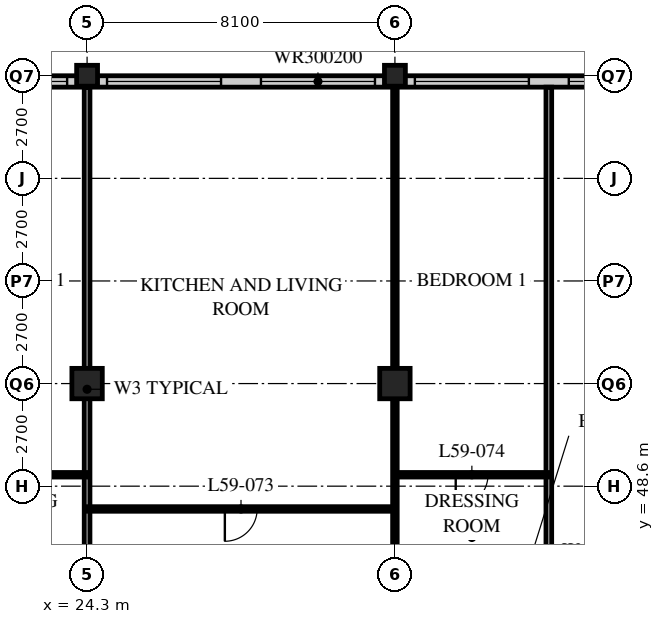
"""IFC4 building model, lengths in metres.
Left out: names, types, materials, properties, quantities, classifications, styles, units other than length and angle.
Written with IfcOpenShell. Run it as: python <this file> out.ifc"""

import sys

from ifc_helpers import new_model, si_unit, direction, frame, frame_2d, origin, origin_2d, place, context, subcontext, project, spatial, rectangle, hollow_rectangle, extrude, element, fill, save


model = new_model("IFC4")
c1 = context("Model", 3, precision=1e-05, world=origin(), true_north=direction((0.0, 1.0)))
c2 = subcontext(c1, "Body", "Model", "MODEL_VIEW")
j1 = project(units=[si_unit("LENGTHUNIT", "METRE"), si_unit("PLANEANGLEUNIT", "RADIAN")], contexts=[c1])
p1 = place(None, origin())
s1 = spatial("IfcSite", under=j1, at=p1, CompositionType="ELEMENT")
p2 = place(p1, origin())
s2 = spatial("IfcBuilding", under=s1, at=p2, CompositionType="ELEMENT")
p3 = place(p2, frame((0.0, 0.0, 228.0)))
s3 = spatial("IfcBuildingStorey", under=s2, at=p3, CompositionType="ELEMENT", Elevation=228.0)
p4 = place(p3, frame((24.3, 51.3, 0.0), z_axis=(0.0, 0.0, 1.0), x_axis=(1.0, 0.0, 0.0)))
e1 = element("IfcColumn", 1, at=p4, inside=s3, PredefinedType="COLUMN", context=c2, shape_type="SweptSolid", body=[
    extrude(hollow_rectangle(XDim=0.8, YDim=0.8, WallThickness=0.08, at=origin_2d()), origin(), (0.0, 0.0, 1.0), 3.6),
])
p5 = place(p3, frame((24.3, 59.4, 0.0), z_axis=(0.0, 0.0, 1.0), x_axis=(1.0, 0.0, 0.0)))
e2 = element("IfcColumn", 2, at=p5, inside=s3, PredefinedType="COLUMN", context=c2, shape_type="SweptSolid", body=[
    extrude(hollow_rectangle(XDim=0.55, YDim=0.55, WallThickness=0.045, at=origin_2d()), origin(), (0.0, 0.0, 1.0), 3.6),
])
p6 = place(p3, frame((32.4, 51.3, 0.0), z_axis=(0.0, 0.0, 1.0), x_axis=(1.0, 0.0, 0.0)))
e3 = element("IfcColumn", 3, at=p6, inside=s3, PredefinedType="COLUMN", context=c2, shape_type="SweptSolid", body=[
    extrude(hollow_rectangle(XDim=0.8, YDim=0.8, WallThickness=0.08, at=origin_2d()), origin(), (0.0, 0.0, 1.0), 3.6),
])
p7 = place(p3, frame((32.4, 59.4, 0.0), z_axis=(0.0, 0.0, 1.0), x_axis=(1.0, 0.0, 0.0)))
e4 = element("IfcColumn", 4, at=p7, inside=s3, PredefinedType="COLUMN", context=c2, shape_type="SweptSolid", body=[
    extrude(hollow_rectangle(XDim=0.55, YDim=0.55, WallThickness=0.045, at=origin_2d()), origin(), (0.0, 0.0, 1.0), 3.6),
])
p8 = place(p3, frame((48.3, 59.25, 0.0), z_axis=(0.0, 0.0, 1.0), x_axis=(-1.0, 0.0, 0.0)))
e5 = element("IfcWall", 5, at=p8, inside=s3, PredefinedType="SOLIDWALL", context=c2, shape_type="SweptSolid", body=[
    extrude(rectangle(XDim=40.2, YDim=0.3, at=frame_2d((20.1, 0.0))), origin(), (0.0, 0.0, 1.0), 3.39),
])
p9 = place(p8, frame((0.225, 0.0, 0.6)))
e6 = element("IfcOpeningElement", 6, at=p9, cuts=e5, PredefinedType="OPENING", context=c2, shape_type="SweptSolid", body=[
    extrude(rectangle(XDim=3.0, YDim=2.0, at=frame_2d((1.5, 1.0))), frame((0.0, 0.16, 0.0), z_axis=(0.0, -1.0, 0.0), x_axis=(1.0, 0.0, 0.0)), (0.0, 0.0, 1.0), 0.32),
])
p10 = place(p8, frame((4.275, 0.0, 0.6)))
e7 = element("IfcOpeningElement", 7, at=p10, cuts=e5, PredefinedType="OPENING", context=c2, shape_type="SweptSolid", body=[
    extrude(rectangle(XDim=3.0, YDim=2.0, at=frame_2d((1.5, 1.0))), frame((0.0, 0.16, 0.0), z_axis=(0.0, -1.0, 0.0), x_axis=(1.0, 0.0, 0.0)), (0.0, 0.0, 1.0), 0.32),
])
p11 = place(p8, frame((8.325, 0.0, 0.6)))
e8 = element("IfcOpeningElement", 8, at=p11, cuts=e5, PredefinedType="OPENING", context=c2, shape_type="SweptSolid", body=[
    extrude(rectangle(XDim=3.0, YDim=2.0, at=frame_2d((1.5, 1.0))), frame((0.0, 0.16, 0.0), z_axis=(0.0, -1.0, 0.0), x_axis=(1.0, 0.0, 0.0)), (0.0, 0.0, 1.0), 0.32),
])
p12 = place(p8, frame((12.375, 0.0, 0.6)))
e9 = element("IfcOpeningElement", 9, at=p12, cuts=e5, PredefinedType="OPENING", context=c2, shape_type="SweptSolid", body=[
    extrude(rectangle(XDim=3.0, YDim=2.0, at=frame_2d((1.5, 1.0))), frame((0.0, 0.16, 0.0), z_axis=(0.0, -1.0, 0.0), x_axis=(1.0, 0.0, 0.0)), (0.0, 0.0, 1.0), 0.32),
])
p13 = place(p8, frame((16.425, 0.0, 0.6)))
e10 = element("IfcOpeningElement", 10, at=p13, cuts=e5, PredefinedType="OPENING", context=c2, shape_type="SweptSolid", body=[
    extrude(rectangle(XDim=3.0, YDim=2.0, at=frame_2d((1.5, 1.0))), frame((0.0, 0.16, 0.0), z_axis=(0.0, -1.0, 0.0), x_axis=(1.0, 0.0, 0.0)), (0.0, 0.0, 1.0), 0.32),
])
p14 = place(p8, frame((20.475, 0.0, 0.6)))
e11 = element("IfcOpeningElement", 11, at=p14, cuts=e5, PredefinedType="OPENING", context=c2, shape_type="SweptSolid", body=[
    extrude(rectangle(XDim=3.0, YDim=2.0, at=frame_2d((1.5, 1.0))), frame((0.0, 0.16, 0.0), z_axis=(0.0, -1.0, 0.0), x_axis=(1.0, 0.0, 0.0)), (0.0, 0.0, 1.0), 0.32),
])
p15 = place(p8, frame((24.525, 0.0, 0.6)))
e12 = element("IfcOpeningElement", 12, at=p15, cuts=e5, PredefinedType="OPENING", context=c2, shape_type="SweptSolid", body=[
    extrude(rectangle(XDim=3.0, YDim=2.0, at=frame_2d((1.5, 1.0))), frame((0.0, 0.16, 0.0), z_axis=(0.0, -1.0, 0.0), x_axis=(1.0, 0.0, 0.0)), (0.0, 0.0, 1.0), 0.32),
])
p16 = place(p8, frame((28.575, 0.0, 0.6)))
e13 = element("IfcOpeningElement", 13, at=p16, cuts=e5, PredefinedType="OPENING", context=c2, shape_type="SweptSolid", body=[
    extrude(rectangle(XDim=3.0, YDim=2.0, at=frame_2d((1.5, 1.0))), frame((0.0, 0.16, 0.0), z_axis=(0.0, -1.0, 0.0), x_axis=(1.0, 0.0, 0.0)), (0.0, 0.0, 1.0), 0.32),
])
p17 = place(p8, frame((32.625, 0.0, 0.6)))
e14 = element("IfcOpeningElement", 14, at=p17, cuts=e5, PredefinedType="OPENING", context=c2, shape_type="SweptSolid", body=[
    extrude(rectangle(XDim=3.0, YDim=2.0, at=frame_2d((1.5, 1.0))), frame((0.0, 0.16, 0.0), z_axis=(0.0, -1.0, 0.0), x_axis=(1.0, 0.0, 0.0)), (0.0, 0.0, 1.0), 0.32),
])
p18 = place(p8, frame((36.675, 0.0, 0.6)))
e15 = element("IfcOpeningElement", 15, at=p18, cuts=e5, PredefinedType="OPENING", context=c2, shape_type="SweptSolid", body=[
    extrude(rectangle(XDim=3.0, YDim=2.0, at=frame_2d((1.5, 1.0))), frame((0.0, 0.16, 0.0), z_axis=(0.0, -1.0, 0.0), x_axis=(1.0, 0.0, 0.0)), (0.0, 0.0, 1.0), 0.32),
])
p19 = place(p3, frame((24.3, 43.2, 0.0), z_axis=(0.0, 0.0, 1.0), x_axis=(0.0, 1.0, 0.0)))
e16 = element("IfcWall", 16, at=p19, inside=s3, PredefinedType="PARTITIONING", context=c2, shape_type="SweptSolid", body=[
    extrude(rectangle(XDim=15.9, YDim=0.15, at=frame_2d((7.95, 0.0))), origin(), (0.0, 0.0, 1.0), 2.628),
])
p20 = place(p3, frame((32.4, 45.6, 0.0), z_axis=(0.0, 0.0, 1.0), x_axis=(0.0, 1.0, 0.0)))
e17 = element("IfcWall", 17, at=p20, inside=s3, PredefinedType="PARTITIONING", context=c2, shape_type="SweptSolid", body=[
    extrude(rectangle(XDim=13.5, YDim=0.12, at=frame_2d((6.75, 0.0))), origin(), (0.0, 0.0, 1.0), 2.628),
])
p21 = place(p3, frame((36.45, 43.2, 0.0), z_axis=(0.0, 0.0, 1.0), x_axis=(0.0, 1.0, 0.0)))
e18 = element("IfcWall", 18, at=p21, inside=s3, PredefinedType="PARTITIONING", context=c2, shape_type="SweptSolid", body=[
    extrude(rectangle(XDim=15.9, YDim=0.15, at=frame_2d((7.95, 0.0))), origin(), (0.0, 0.0, 1.0), 3.39),
])
p22 = place(p3, frame((20.25, 48.9, 0.0), z_axis=(0.0, 0.0, 1.0), x_axis=(1.0, 0.0, 0.0)))
e19 = element("IfcWall", 19, at=p22, inside=s3, PredefinedType="PARTITIONING", context=c2, shape_type="SweptSolid", body=[
    extrude(rectangle(XDim=4.05, YDim=0.12, at=frame_2d((2.025, 0.0))), origin(), (0.0, 0.0, 1.0), 3.39),
])
p23 = place(p22, frame((1.6, 0.0, 0.0)))
e20 = element("IfcOpeningElement", 20, at=p23, cuts=e19, PredefinedType="OPENING", context=c2, shape_type="SweptSolid", body=[
    extrude(rectangle(XDim=0.85, YDim=2.1, at=frame_2d((0.425, 1.05))), frame((0.0, 0.07, 0.0), z_axis=(0.0, -1.0, 0.0), x_axis=(1.0, 0.0, 0.0)), (0.0, 0.0, 1.0), 0.14),
])
p24 = place(p3, frame((24.3, 48.0, 0.0), z_axis=(0.0, 0.0, 1.0), x_axis=(1.0, 0.0, 0.0)))
e21 = element("IfcWall", 21, at=p24, inside=s3, PredefinedType="PARTITIONING", context=c2, shape_type="SweptSolid", body=[
    extrude(rectangle(XDim=8.1, YDim=0.12, at=frame_2d((4.05, 0.0))), origin(), (0.0, 0.0, 1.0), 3.39),
])
p25 = place(p24, frame((3.625, 0.0, 0.0)))
e22 = element("IfcOpeningElement", 22, at=p25, cuts=e21, PredefinedType="OPENING", context=c2, shape_type="SweptSolid", body=[
    extrude(rectangle(XDim=0.85, YDim=2.1, at=frame_2d((0.425, 1.05))), frame((0.0, 0.07, 0.0), z_axis=(0.0, -1.0, 0.0), x_axis=(1.0, 0.0, 0.0)), (0.0, 0.0, 1.0), 0.14),
])
p26 = place(p3, frame((32.4, 48.9, 0.0), z_axis=(0.0, 0.0, 1.0), x_axis=(1.0, 0.0, 0.0)))
e23 = element("IfcWall", 23, at=p26, inside=s3, PredefinedType="PARTITIONING", context=c2, shape_type="SweptSolid", body=[
    extrude(rectangle(XDim=4.05, YDim=0.12, at=frame_2d((2.025, 0.0))), origin(), (0.0, 0.0, 1.0), 3.39),
])
p27 = place(p26, frame((1.6, 0.0, 0.0)))
e24 = element("IfcOpeningElement", 24, at=p27, cuts=e23, PredefinedType="OPENING", context=c2, shape_type="SweptSolid", body=[
    extrude(rectangle(XDim=0.85, YDim=2.1, at=frame_2d((0.425, 1.05))), frame((0.0, 0.07, 0.0), z_axis=(0.0, -1.0, 0.0), x_axis=(1.0, 0.0, 0.0)), (0.0, 0.0, 1.0), 0.14),
])
p28 = place(p11, origin())
e25 = element("IfcWindow", 25, at=p28, inside=s3, PartitioningType="SINGLE_PANEL", PredefinedType="WINDOW", context=c2, shape_type="SweptSolid", body=[
    extrude(rectangle(XDim=3.0, YDim=2.0, at=frame_2d((1.5, 1.0))), frame((0.0, 0.03, 0.0), z_axis=(0.0, -1.0, 0.0), x_axis=(1.0, 0.0, 0.0)), (0.0, 0.0, 1.0), 0.06),
])
fill(e8, e25)
p29 = place(p12, origin())
e26 = element("IfcWindow", 26, at=p29, inside=s3, PartitioningType="SINGLE_PANEL", PredefinedType="WINDOW", context=c2, shape_type="SweptSolid", body=[
    extrude(rectangle(XDim=3.0, YDim=2.0, at=frame_2d((1.5, 1.0))), frame((0.0, 0.03, 0.0), z_axis=(0.0, -1.0, 0.0), x_axis=(1.0, 0.0, 0.0)), (0.0, 0.0, 1.0), 0.06),
])
fill(e9, e26)
p30 = place(p13, origin())
e27 = element("IfcWindow", 27, at=p30, inside=s3, PartitioningType="SINGLE_PANEL", PredefinedType="WINDOW", context=c2, shape_type="SweptSolid", body=[
    extrude(rectangle(XDim=3.0, YDim=2.0, at=frame_2d((1.5, 1.0))), frame((0.0, 0.03, 0.0), z_axis=(0.0, -1.0, 0.0), x_axis=(1.0, 0.0, 0.0)), (0.0, 0.0, 1.0), 0.06),
])
fill(e10, e27)
p31 = place(p14, origin())
e28 = element("IfcWindow", 28, at=p31, inside=s3, PartitioningType="SINGLE_PANEL", PredefinedType="WINDOW", context=c2, shape_type="SweptSolid", body=[
    extrude(rectangle(XDim=3.0, YDim=2.0, at=frame_2d((1.5, 1.0))), frame((0.0, 0.03, 0.0), z_axis=(0.0, -1.0, 0.0), x_axis=(1.0, 0.0, 0.0)), (0.0, 0.0, 1.0), 0.06),
])
fill(e11, e28)
p32 = place(p15, origin())
e29 = element("IfcWindow", 29, at=p32, inside=s3, PartitioningType="SINGLE_PANEL", PredefinedType="WINDOW", context=c2, shape_type="SweptSolid", body=[
    extrude(rectangle(XDim=3.0, YDim=2.0, at=frame_2d((1.5, 1.0))), frame((0.0, 0.03, 0.0), z_axis=(0.0, -1.0, 0.0), x_axis=(1.0, 0.0, 0.0)), (0.0, 0.0, 1.0), 0.06),
])
fill(e12, e29)
p33 = place(p25, origin())
e30 = element("IfcDoor", 30, at=p33, inside=s3, OperationType="SINGLE_SWING_RIGHT", PredefinedType="DOOR", context=c2, shape_type="SweptSolid", body=[
    extrude(rectangle(XDim=0.85, YDim=2.1, at=frame_2d((0.425, 1.05))), frame((0.0, 0.025, 0.0), z_axis=(0.0, -1.0, 0.0), x_axis=(1.0, 0.0, 0.0)), (0.0, 0.0, 1.0), 0.05),
])
fill(e22, e30)
p34 = place(p27, origin())
e31 = element("IfcDoor", 31, at=p34, inside=s3, OperationType="SINGLE_SWING_RIGHT", PredefinedType="DOOR", context=c2, shape_type="SweptSolid", body=[
    extrude(rectangle(XDim=0.85, YDim=2.1, at=frame_2d((0.425, 1.05))), frame((0.0, 0.025, 0.0), z_axis=(0.0, -1.0, 0.0), x_axis=(1.0, 0.0, 0.0)), (0.0, 0.0, 1.0), 0.05),
])
fill(e24, e31)
save(model, sys.argv[1])
